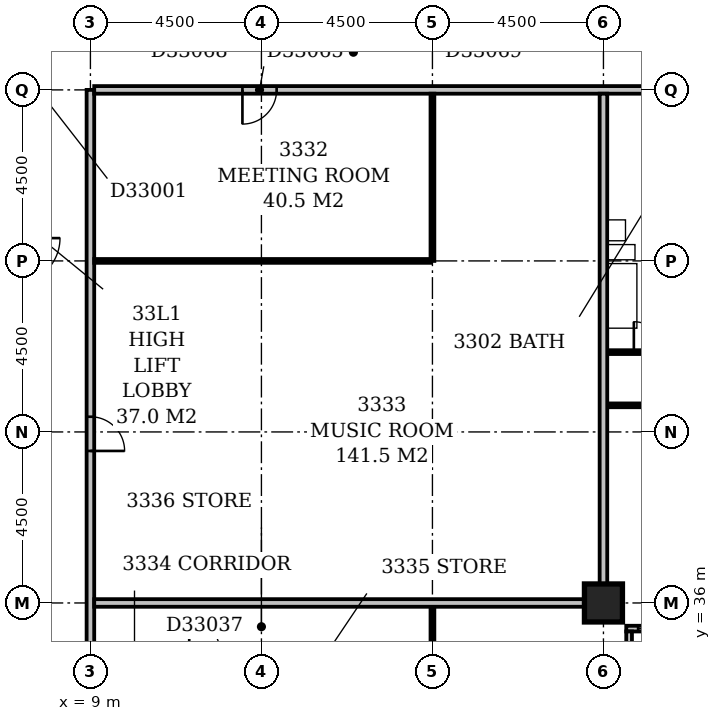
"""IFC4 building model, lengths in metres.
Left out: names, types, materials, properties, quantities, classifications, styles, units other than length and angle.
Written with IfcOpenShell. Run it as: python <this file> out.ifc"""

import sys

from ifc_helpers import new_model, si_unit, direction, frame, frame_2d, origin, origin_2d, place, context, subcontext, project, spatial, rectangle, extrude, element, fill, save


model = new_model("IFC4")
c1 = context("Model", 3, precision=1e-05, world=origin(), true_north=direction((0.0, 1.0)))
c2 = subcontext(c1, "Body", "Model", "MODEL_VIEW")
j1 = project(units=[si_unit("LENGTHUNIT", "METRE"), si_unit("PLANEANGLEUNIT", "RADIAN")], contexts=[c1])
p1 = place(None, origin())
s1 = spatial("IfcSite", under=j1, at=p1, CompositionType="ELEMENT")
p2 = place(p1, origin())
s2 = spatial("IfcBuilding", under=s1, at=p2, CompositionType="ELEMENT")
p3 = place(p2, frame((0.0, 0.0, 134.0)))
s3 = spatial("IfcBuildingStorey", under=s2, at=p3, CompositionType="ELEMENT", Elevation=134.0)
p4 = place(p3, frame((22.5, 36.0, -0.3), z_axis=(0.0, 0.0, 1.0), x_axis=(1.0, 0.0, 0.0)))
e1 = element("IfcColumn", 1, at=p4, inside=s3, PredefinedType="COLUMN", context=c2, shape_type="SweptSolid", body=[
    extrude(rectangle(XDim=1.0, YDim=1.0, at=origin_2d()), origin(), (0.0, 0.0, 1.0), 3.6),
])
p5 = place(p3, frame((23.175, 17.4, 0.0), z_axis=(0.0, 0.0, 1.0), x_axis=(0.0, 1.0, 0.0)))
e2 = element("IfcWall", 2, at=p5, inside=s3, PredefinedType="STANDARD", context=c2, shape_type="SweptSolid", body=[
    extrude(rectangle(XDim=17.85, YDim=0.15, at=frame_2d((8.925, 0.0))), origin(), (0.0, 0.0, 1.0), 2.7),
])
p6 = place(p5, frame((1.385, 0.0, 0.6)))
e3 = element("IfcOpeningElement", 3, at=p6, cuts=e2, PredefinedType="OPENING", context=c2, shape_type="SweptSolid", body=[
    extrude(rectangle(XDim=2.1, YDim=1.8, at=frame_2d((1.05, 0.9))), frame((0.0, 0.087, 0.0), z_axis=(0.0, -1.0, 0.0), x_axis=(1.0, 0.0, 0.0)), (0.0, 0.0, 1.0), 0.174),
])
p7 = place(p5, frame((6.15, 0.0, 0.6)))
e4 = element("IfcOpeningElement", 4, at=p7, cuts=e2, PredefinedType="OPENING", context=c2, shape_type="SweptSolid", body=[
    extrude(rectangle(XDim=2.4, YDim=1.8, at=frame_2d((1.2, 0.9))), frame((0.0, 0.087, 0.0), z_axis=(0.0, -1.0, 0.0), x_axis=(1.0, 0.0, 0.0)), (0.0, 0.0, 1.0), 0.174),
])
p8 = place(p5, frame((10.65, 0.0, 0.6)))
e5 = element("IfcOpeningElement", 5, at=p8, cuts=e2, PredefinedType="OPENING", context=c2, shape_type="SweptSolid", body=[
    extrude(rectangle(XDim=2.4, YDim=1.8, at=frame_2d((1.2, 0.9))), frame((0.0, 0.087, 0.0), z_axis=(0.0, -1.0, 0.0), x_axis=(1.0, 0.0, 0.0)), (0.0, 0.0, 1.0), 0.174),
])
p9 = place(p5, frame((15.15, 0.0, 0.6)))
e6 = element("IfcOpeningElement", 6, at=p9, cuts=e2, PredefinedType="OPENING", context=c2, shape_type="SweptSolid", body=[
    extrude(rectangle(XDim=2.4, YDim=1.8, at=frame_2d((1.2, 0.9))), frame((0.0, 0.087, 0.0), z_axis=(0.0, -1.0, 0.0), x_axis=(1.0, 0.0, 0.0)), (0.0, 0.0, 1.0), 0.174),
])
p10 = place(p3, frame((23.1, 35.325, 0.0), z_axis=(0.0, 0.0, 1.0), x_axis=(1.0, 0.0, 0.0)))
e7 = element("IfcWall", 7, at=p10, inside=s3, PredefinedType="STANDARD", context=c2, shape_type="SweptSolid", body=[
    extrude(rectangle(XDim=45.15, YDim=0.15, at=frame_2d((22.575, 0.0))), origin(), (0.0, 0.0, 1.0), 2.7),
])
p11 = place(p10, frame((0.312, 0.0, 0.6)))
e8 = element("IfcOpeningElement", 8, at=p11, cuts=e7, PredefinedType="OPENING", context=c2, shape_type="SweptSolid", body=[
    extrude(rectangle(XDim=2.1, YDim=1.8, at=frame_2d((1.05, 0.9))), frame((0.0, 0.087, 0.0), z_axis=(0.0, -1.0, 0.0), x_axis=(1.0, 0.0, 0.0)), (0.0, 0.0, 1.0), 0.174),
])
p12 = place(p10, frame((4.95, 0.0, 0.6)))
e9 = element("IfcOpeningElement", 9, at=p12, cuts=e7, PredefinedType="OPENING", context=c2, shape_type="SweptSolid", body=[
    extrude(rectangle(XDim=2.4, YDim=1.8, at=frame_2d((1.2, 0.9))), frame((0.0, 0.087, 0.0), z_axis=(0.0, -1.0, 0.0), x_axis=(1.0, 0.0, 0.0)), (0.0, 0.0, 1.0), 0.174),
])
p13 = place(p10, frame((9.45, 0.0, 0.6)))
e10 = element("IfcOpeningElement", 10, at=p13, cuts=e7, PredefinedType="OPENING", context=c2, shape_type="SweptSolid", body=[
    extrude(rectangle(XDim=2.4, YDim=1.8, at=frame_2d((1.2, 0.9))), frame((0.0, 0.087, 0.0), z_axis=(0.0, -1.0, 0.0), x_axis=(1.0, 0.0, 0.0)), (0.0, 0.0, 1.0), 0.174),
])
p14 = place(p10, frame((13.95, 0.0, 0.6)))
e11 = element("IfcOpeningElement", 11, at=p14, cuts=e7, PredefinedType="OPENING", context=c2, shape_type="SweptSolid", body=[
    extrude(rectangle(XDim=2.4, YDim=1.8, at=frame_2d((1.2, 0.9))), frame((0.0, 0.087, 0.0), z_axis=(0.0, -1.0, 0.0), x_axis=(1.0, 0.0, 0.0)), (0.0, 0.0, 1.0), 0.174),
])
p15 = place(p10, frame((18.45, 0.0, 0.6)))
e12 = element("IfcOpeningElement", 12, at=p15, cuts=e7, PredefinedType="OPENING", context=c2, shape_type="SweptSolid", body=[
    extrude(rectangle(XDim=2.4, YDim=1.8, at=frame_2d((1.2, 0.9))), frame((0.0, 0.087, 0.0), z_axis=(0.0, -1.0, 0.0), x_axis=(1.0, 0.0, 0.0)), (0.0, 0.0, 1.0), 0.174),
])
p16 = place(p10, frame((24.146, 0.0, 0.6)))
e13 = element("IfcOpeningElement", 13, at=p16, cuts=e7, PredefinedType="OPENING", context=c2, shape_type="SweptSolid", body=[
    extrude(rectangle(XDim=1.5, YDim=1.8, at=frame_2d((0.75, 0.9))), frame((0.0, 0.087, 0.0), z_axis=(0.0, -1.0, 0.0), x_axis=(1.0, 0.0, 0.0)), (0.0, 0.0, 1.0), 0.174),
])
p17 = place(p10, frame((27.131, 0.0, 0.6)))
e14 = element("IfcOpeningElement", 14, at=p17, cuts=e7, PredefinedType="OPENING", context=c2, shape_type="SweptSolid", body=[
    extrude(rectangle(XDim=2.4, YDim=1.8, at=frame_2d((1.2, 0.9))), frame((0.0, 0.087, 0.0), z_axis=(0.0, -1.0, 0.0), x_axis=(1.0, 0.0, 0.0)), (0.0, 0.0, 1.0), 0.174),
])
p18 = place(p10, frame((31.95, 0.0, 0.6)))
e15 = element("IfcOpeningElement", 15, at=p18, cuts=e7, PredefinedType="OPENING", context=c2, shape_type="SweptSolid", body=[
    extrude(rectangle(XDim=2.4, YDim=1.8, at=frame_2d((1.2, 0.9))), frame((0.0, 0.087, 0.0), z_axis=(0.0, -1.0, 0.0), x_axis=(1.0, 0.0, 0.0)), (0.0, 0.0, 1.0), 0.174),
])
p19 = place(p10, frame((36.45, 0.0, 0.6)))
e16 = element("IfcOpeningElement", 16, at=p19, cuts=e7, PredefinedType="OPENING", context=c2, shape_type="SweptSolid", body=[
    extrude(rectangle(XDim=2.4, YDim=1.8, at=frame_2d((1.2, 0.9))), frame((0.0, 0.087, 0.0), z_axis=(0.0, -1.0, 0.0), x_axis=(1.0, 0.0, 0.0)), (0.0, 0.0, 1.0), 0.174),
])
p20 = place(p10, frame((40.95, 0.0, 0.6)))
e17 = element("IfcOpeningElement", 17, at=p20, cuts=e7, PredefinedType="OPENING", context=c2, shape_type="SweptSolid", body=[
    extrude(rectangle(XDim=2.4, YDim=1.8, at=frame_2d((1.2, 0.9))), frame((0.0, 0.087, 0.0), z_axis=(0.0, -1.0, 0.0), x_axis=(1.0, 0.0, 0.0)), (0.0, 0.0, 1.0), 0.174),
])
p21 = place(p3, frame((18.0, 31.6, 0.0), z_axis=(0.0, 0.0, 1.0), x_axis=(0.0, 1.0, 0.0)))
e18 = element("IfcWall", 18, at=p21, inside=s3, PredefinedType="PARTITIONING", context=c2, shape_type="SweptSolid", body=[
    extrude(rectangle(XDim=4.3, YDim=0.1, at=frame_2d((2.15, 0.0))), origin(), (0.0, 0.0, 1.0), 3.3),
])
p22 = place(p21, frame((1.7, 0.0, 0.0)))
e19 = element("IfcOpeningElement", 19, at=p22, cuts=e18, PredefinedType="OPENING", context=c2, shape_type="SweptSolid", body=[
    extrude(rectangle(XDim=0.9, YDim=2.1, at=frame_2d((0.45, 1.05))), frame((0.0, 0.062, 0.0), z_axis=(0.0, -1.0, 0.0), x_axis=(1.0, 0.0, 0.0)), (0.0, 0.0, 1.0), 0.124),
])
p23 = place(p3, frame((9.0, 34.75, 0.0), z_axis=(0.0, 0.0, 1.0), x_axis=(0.0, 1.0, 0.0)))
e20 = element("IfcWall", 20, at=p23, inside=s3, PredefinedType="PARTITIONING", context=c2, shape_type="SweptSolid", body=[
    extrude(rectangle(XDim=14.75, YDim=0.2, at=frame_2d((7.375, 0.0))), origin(), (0.0, 0.0, 1.0), 3.3),
])
p24 = place(p23, frame((5.25, 0.0, 0.0)))
e21 = element("IfcOpeningElement", 21, at=p24, cuts=e20, PredefinedType="OPENING", context=c2, shape_type="SweptSolid", body=[
    extrude(rectangle(XDim=0.9, YDim=2.1, at=frame_2d((0.45, 1.05))), frame((0.0, 0.112, 0.0), z_axis=(0.0, -1.0, 0.0), x_axis=(1.0, 0.0, 0.0)), (0.0, 0.0, 1.0), 0.224),
])
for number, where, z_axis, x_axis in (
    (22, (9.1, 36.0, 0.0), (0.0, 0.0, 1.0), (1.0, 0.0, 0.0)),
    (23, (22.5, 36.5, 0.0), (0.0, 0.0, 1.0), (0.0, 1.0, 0.0)),
):
    element("IfcWall", number, at=place(p3, frame(where, z_axis=z_axis, x_axis=x_axis)), inside=s3, PredefinedType="PARTITIONING", context=c2, shape_type="SweptSolid", body=[
        extrude(rectangle(XDim=12.9, YDim=0.2, at=frame_2d((6.45, 0.0))), origin(), (0.0, 0.0, 1.0), 3.3),
    ])
p25 = place(p3, frame((22.6, 41.2, 0.0), z_axis=(0.0, 0.0, 1.0), x_axis=(1.0, 0.0, 0.0)))
e24 = element("IfcWall", 24, at=p25, inside=s3, PredefinedType="PARTITIONING", context=c2, shape_type="SweptSolid", body=[
    extrude(rectangle(XDim=13.3, YDim=0.1, at=frame_2d((6.65, 0.0))), origin(), (0.0, 0.0, 1.0), 3.3),
])
p26 = place(p25, frame((1.7, 0.0, 0.0)))
e25 = element("IfcOpeningElement", 25, at=p26, cuts=e24, PredefinedType="OPENING", context=c2, shape_type="SweptSolid", body=[
    extrude(rectangle(XDim=0.9, YDim=2.1, at=frame_2d((0.45, 1.05))), frame((0.0, 0.062, 0.0), z_axis=(0.0, -1.0, 0.0), x_axis=(1.0, 0.0, 0.0)), (0.0, 0.0, 1.0), 0.124),
])
p27 = place(p25, frame((6.2, 0.0, 0.0)))
e26 = element("IfcOpeningElement", 26, at=p27, cuts=e24, PredefinedType="OPENING", context=c2, shape_type="SweptSolid", body=[
    extrude(rectangle(XDim=0.9, YDim=2.1, at=frame_2d((0.45, 1.05))), frame((0.0, 0.062, 0.0), z_axis=(0.0, -1.0, 0.0), x_axis=(1.0, 0.0, 0.0)), (0.0, 0.0, 1.0), 0.124),
])
p28 = place(p25, frame((10.7, 0.0, 0.0)))
e27 = element("IfcOpeningElement", 27, at=p28, cuts=e24, PredefinedType="OPENING", context=c2, shape_type="SweptSolid", body=[
    extrude(rectangle(XDim=0.9, YDim=2.1, at=frame_2d((0.45, 1.05))), frame((0.0, 0.062, 0.0), z_axis=(0.0, -1.0, 0.0), x_axis=(1.0, 0.0, 0.0)), (0.0, 0.0, 1.0), 0.124),
])
p29 = place(p3, frame((22.6, 42.6, 0.0), z_axis=(0.0, 0.0, 1.0), x_axis=(1.0, 0.0, 0.0)))
e28 = element("IfcWall", 28, at=p29, inside=s3, PredefinedType="PARTITIONING", context=c2, shape_type="SweptSolid", body=[
    extrude(rectangle(XDim=6.15, YDim=0.1, at=frame_2d((3.075, 0.0))), origin(), (0.0, 0.0, 1.0), 3.3),
])
p30 = place(p29, frame((0.7, 0.0, 0.0)))
e29 = element("IfcOpeningElement", 29, at=p30, cuts=e28, PredefinedType="OPENING", context=c2, shape_type="SweptSolid", body=[
    extrude(rectangle(XDim=0.8, YDim=2.1, at=frame_2d((0.4, 1.05))), frame((0.0, 0.062, 0.0), z_axis=(0.0, -1.0, 0.0), x_axis=(1.0, 0.0, 0.0)), (0.0, 0.0, 1.0), 0.124),
])
p31 = place(p29, frame((3.8, 0.0, 0.0)))
e30 = element("IfcOpeningElement", 30, at=p31, cuts=e28, PredefinedType="OPENING", context=c2, shape_type="SweptSolid", body=[
    extrude(rectangle(XDim=0.9, YDim=2.1, at=frame_2d((0.45, 1.05))), frame((0.0, 0.062, 0.0), z_axis=(0.0, -1.0, 0.0), x_axis=(1.0, 0.0, 0.0)), (0.0, 0.0, 1.0), 0.124),
])
p32 = place(p3, frame((9.1, 45.0, 0.0), z_axis=(0.0, 0.0, 1.0), x_axis=(1.0, 0.0, 0.0)))
e31 = element("IfcWall", 31, at=p32, inside=s3, PredefinedType="PARTITIONING", context=c2, shape_type="SweptSolid", body=[
    extrude(rectangle(XDim=8.85, YDim=0.1, at=frame_2d((4.425, 0.0))), origin(), (0.0, 0.0, 1.0), 3.3),
])
p33 = place(p3, frame((18.0, 45.0, 0.0), z_axis=(0.0, 0.0, 1.0), x_axis=(0.0, 1.0, 0.0)))
e32 = element("IfcWall", 32, at=p33, inside=s3, PredefinedType="PARTITIONING", context=c2, shape_type="SweptSolid", body=[
    extrude(rectangle(XDim=4.4, YDim=0.1, at=frame_2d((2.2, 0.0))), origin(), (0.0, 0.0, 1.0), 3.3),
])
p34 = place(p3, frame((9.1, 49.5, 0.0), z_axis=(0.0, 0.0, 1.0), x_axis=(1.0, 0.0, 0.0)))
e33 = element("IfcWall", 33, at=p34, inside=s3, PredefinedType="PARTITIONING", context=c2, shape_type="SweptSolid", body=[
    extrude(rectangle(XDim=28.05, YDim=0.2, at=frame_2d((14.025, 0.0))), origin(), (0.0, 0.0, 1.0), 3.3),
])
p35 = place(p34, frame((20.0, 0.0, 0.0)))
e34 = element("IfcOpeningElement", 34, at=p35, cuts=e33, PredefinedType="OPENING", context=c2, shape_type="SweptSolid", body=[
    extrude(rectangle(XDim=1.0, YDim=2.1, at=frame_2d((0.5, 1.05))), frame((0.0, 0.112, 0.0), z_axis=(0.0, -1.0, 0.0), x_axis=(1.0, 0.0, 0.0)), (0.0, 0.0, 1.0), 0.224),
])
p36 = place(p34, frame((3.9, 0.0, 0.0)))
e35 = element("IfcOpeningElement", 35, at=p36, cuts=e33, PredefinedType="OPENING", context=c2, shape_type="SweptSolid", body=[
    extrude(rectangle(XDim=0.9, YDim=2.1, at=frame_2d((0.45, 1.05))), frame((0.0, 0.112, 0.0), z_axis=(0.0, -1.0, 0.0), x_axis=(1.0, 0.0, 0.0)), (0.0, 0.0, 1.0), 0.224),
])
p37 = place(p11, origin())
e36 = element("IfcWindow", 36, at=p37, inside=s3, PartitioningType="SINGLE_PANEL", PredefinedType="WINDOW", context=c2, shape_type="SweptSolid", body=[
    extrude(rectangle(XDim=2.1, YDim=1.8, at=frame_2d((1.05, 0.9))), frame((0.0, 0.03, 0.0), z_axis=(0.0, -1.0, 0.0), x_axis=(1.0, 0.0, 0.0)), (0.0, 0.0, 1.0), 0.06),
])
fill(e8, e36)
p38 = place(p24, frame((0.9, 0.0, 0.0), z_axis=(0.0, 0.0, 1.0), x_axis=(-1.0, 0.0, 0.0)))
e37 = element("IfcDoor", 37, at=p38, inside=s3, OperationType="SINGLE_SWING_RIGHT", PredefinedType="DOOR", context=c2, shape_type="SweptSolid", body=[
    extrude(rectangle(XDim=0.9, YDim=2.1, at=frame_2d((0.45, 1.05))), frame((0.0, 0.025, 0.0), z_axis=(0.0, -1.0, 0.0), x_axis=(1.0, 0.0, 0.0)), (0.0, 0.0, 1.0), 0.05),
])
fill(e21, e37)
p39 = place(p30, origin())
e38 = element("IfcDoor", 38, at=p39, inside=s3, OperationType="SINGLE_SWING_LEFT", PredefinedType="DOOR", context=c2, shape_type="SweptSolid", body=[
    extrude(rectangle(XDim=0.8, YDim=2.1, at=frame_2d((0.4, 1.05))), frame((0.0, 0.025, 0.0), z_axis=(0.0, -1.0, 0.0), x_axis=(1.0, 0.0, 0.0)), (0.0, 0.0, 1.0), 0.05),
])
fill(e29, e38)
p40 = place(p36, frame((0.9, 0.0, 0.0), z_axis=(0.0, 0.0, 1.0), x_axis=(-1.0, 0.0, 0.0)))
e39 = element("IfcDoor", 39, at=p40, inside=s3, OperationType="SINGLE_SWING_RIGHT", PredefinedType="DOOR", context=c2, shape_type="SweptSolid", body=[
    extrude(rectangle(XDim=0.9, YDim=2.1, at=frame_2d((0.45, 1.05))), frame((0.0, 0.025, 0.0), z_axis=(0.0, -1.0, 0.0), x_axis=(1.0, 0.0, 0.0)), (0.0, 0.0, 1.0), 0.05),
])
fill(e35, e39)
save(model, sys.argv[1])
